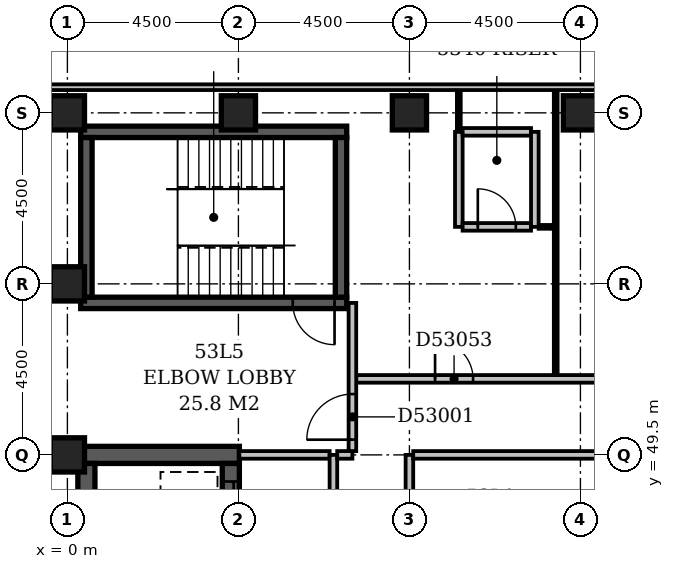
"""IFC4 building model, lengths in metres.
Left out: names, types, materials, properties, quantities, classifications, styles, units other than length and angle.
Written with IfcOpenShell. Run it as: python <this file> out.ifc"""

import sys

from ifc_helpers import new_model, si_unit, direction, frame, frame_2d, origin, origin_2d, place, context, subcontext, project, spatial, rectangle, extrude, element, fill, save


model = new_model("IFC4")
c1 = context("Model", 3, precision=1e-05, world=origin(), true_north=direction((0.0, 1.0)))
c2 = subcontext(c1, "Body", "Model", "MODEL_VIEW")
j1 = project(units=[si_unit("LENGTHUNIT", "METRE"), si_unit("PLANEANGLEUNIT", "RADIAN")], contexts=[c1])
p1 = place(None, origin())
s1 = spatial("IfcSite", under=j1, at=p1, CompositionType="ELEMENT")
p2 = place(p1, origin())
s2 = spatial("IfcBuilding", under=s1, at=p2, CompositionType="ELEMENT")
p3 = place(p2, frame((0.0, 0.0, 207.8)))
s3 = spatial("IfcBuildingStorey", under=s2, at=p3, CompositionType="ELEMENT", Elevation=207.8)
p4 = place(p3, frame((0.275, 49.5, -0.3), z_axis=(0.0, 0.0, 1.0), x_axis=(1.0, 0.0, 0.0)))
e1 = element("IfcWall", 1, at=p4, inside=s3, PredefinedType="SHEAR", context=c2, shape_type="SweptSolid", body=[
    extrude(rectangle(XDim=4.25, YDim=0.45, at=frame_2d((2.125, 0.0))), origin(), (0.0, 0.0, 1.0), 3.55),
])
p5 = place(p3, frame((0.35, 53.5, -0.3), z_axis=(0.0, 0.0, 1.0), x_axis=(1.0, 0.0, 0.0)))
e2 = element("IfcWall", 2, at=p5, inside=s3, PredefinedType="SHEAR", context=c2, shape_type="SweptSolid", body=[
    extrude(rectangle(XDim=7.0, YDim=0.3, at=frame_2d((3.5, 0.0))), origin(), (0.0, 0.0, 1.0), 3.55),
])
p6 = place(p5, frame((5.58, 0.0, 0.3)))
e3 = element("IfcOpeningElement", 3, at=p6, cuts=e2, PredefinedType="OPENING", context=c2, shape_type="SweptSolid", body=[
    extrude(rectangle(XDim=1.1, YDim=2.1, at=frame_2d((0.55, 1.05))), frame((0.0, 0.162, 0.0), z_axis=(0.0, -1.0, 0.0), x_axis=(1.0, 0.0, 0.0)), (0.0, 0.0, 1.0), 0.324),
])
p7 = place(p3, frame((0.35, 58.0, -0.3), z_axis=(0.0, 0.0, 1.0), x_axis=(1.0, 0.0, 0.0)))
e4 = element("IfcWall", 4, at=p7, inside=s3, PredefinedType="SHEAR", context=c2, shape_type="SweptSolid", body=[
    extrude(rectangle(XDim=7.0, YDim=0.3, at=frame_2d((3.5, 0.0))), origin(), (0.0, 0.0, 1.0), 3.55),
])
p8 = place(p3, frame((0.5, 27.15, -0.3), z_axis=(0.0, 0.0, 1.0), x_axis=(0.0, 1.0, 0.0)))
e5 = element("IfcWall", 5, at=p8, inside=s3, PredefinedType="SHEAR", context=c2, shape_type="SweptSolid", body=[
    extrude(rectangle(XDim=22.125, YDim=0.45, at=frame_2d((11.062, 0.0))), origin(), (0.0, 0.0, 1.0), 3.55),
])
p9 = place(p3, frame((0.5, 53.65, -0.3), z_axis=(0.0, 0.0, 1.0), x_axis=(0.0, 1.0, 0.0)))
e6 = element("IfcWall", 6, at=p9, inside=s3, PredefinedType="SHEAR", context=c2, shape_type="SweptSolid", body=[
    extrude(rectangle(XDim=4.2, YDim=0.3, at=frame_2d((2.1, 0.0))), origin(), (0.0, 0.0, 1.0), 3.55),
])
p10 = place(p3, frame((4.3, 27.15, -0.3), z_axis=(0.0, 0.0, 1.0), x_axis=(0.0, 1.0, 0.0)))
e7 = element("IfcWall", 7, at=p10, inside=s3, PredefinedType="SHEAR", context=c2, shape_type="SweptSolid", body=[
    extrude(rectangle(XDim=22.125, YDim=0.45, at=frame_2d((11.062, 0.0))), origin(), (0.0, 0.0, 1.0), 3.55),
])
p11 = place(p10, frame((3.05, 0.0, 0.3)))
e8 = element("IfcOpeningElement", 8, at=p11, cuts=e7, PredefinedType="OPENING", context=c2, shape_type="SweptSolid", body=[
    extrude(rectangle(XDim=1.1, YDim=2.1, at=frame_2d((0.55, 1.05))), frame((0.0, 0.237, 0.0), z_axis=(0.0, -1.0, 0.0), x_axis=(1.0, 0.0, 0.0)), (0.0, 0.0, 1.0), 0.474),
])
p12 = place(p10, frame((0.55, 0.0, 0.3)))
e9 = element("IfcOpeningElement", 9, at=p12, cuts=e7, PredefinedType="OPENING", context=c2, shape_type="SweptSolid", body=[
    extrude(rectangle(XDim=1.1, YDim=2.1, at=frame_2d((0.55, 1.05))), frame((0.0, 0.237, 0.0), z_axis=(0.0, -1.0, 0.0), x_axis=(1.0, 0.0, 0.0)), (0.0, 0.0, 1.0), 0.474),
])
p13 = place(p10, frame((20.55, 0.0, 0.3)))
e10 = element("IfcOpeningElement", 10, at=p13, cuts=e7, PredefinedType="OPENING", context=c2, shape_type="SweptSolid", body=[
    extrude(rectangle(XDim=1.1, YDim=2.1, at=frame_2d((0.55, 1.05))), frame((0.0, 0.237, 0.0), z_axis=(0.0, -1.0, 0.0), x_axis=(1.0, 0.0, 0.0)), (0.0, 0.0, 1.0), 0.474),
])
p14 = place(p10, frame((18.05, 0.0, 0.3)))
e11 = element("IfcOpeningElement", 11, at=p14, cuts=e7, PredefinedType="OPENING", context=c2, shape_type="SweptSolid", body=[
    extrude(rectangle(XDim=1.1, YDim=2.1, at=frame_2d((0.55, 1.05))), frame((0.0, 0.237, 0.0), z_axis=(0.0, -1.0, 0.0), x_axis=(1.0, 0.0, 0.0)), (0.0, 0.0, 1.0), 0.474),
])
p15 = place(p10, frame((15.55, 0.0, 0.3)))
e12 = element("IfcOpeningElement", 12, at=p15, cuts=e7, PredefinedType="OPENING", context=c2, shape_type="SweptSolid", body=[
    extrude(rectangle(XDim=1.1, YDim=2.1, at=frame_2d((0.55, 1.05))), frame((0.0, 0.237, 0.0), z_axis=(0.0, -1.0, 0.0), x_axis=(1.0, 0.0, 0.0)), (0.0, 0.0, 1.0), 0.474),
])
p16 = place(p10, frame((13.05, 0.0, 0.3)))
e13 = element("IfcOpeningElement", 13, at=p16, cuts=e7, PredefinedType="OPENING", context=c2, shape_type="SweptSolid", body=[
    extrude(rectangle(XDim=1.1, YDim=2.1, at=frame_2d((0.55, 1.05))), frame((0.0, 0.237, 0.0), z_axis=(0.0, -1.0, 0.0), x_axis=(1.0, 0.0, 0.0)), (0.0, 0.0, 1.0), 0.474),
])
p17 = place(p10, frame((10.55, 0.0, 0.3)))
e14 = element("IfcOpeningElement", 14, at=p17, cuts=e7, PredefinedType="OPENING", context=c2, shape_type="SweptSolid", body=[
    extrude(rectangle(XDim=1.1, YDim=2.1, at=frame_2d((0.55, 1.05))), frame((0.0, 0.237, 0.0), z_axis=(0.0, -1.0, 0.0), x_axis=(1.0, 0.0, 0.0)), (0.0, 0.0, 1.0), 0.474),
])
p18 = place(p10, frame((8.05, 0.0, 0.3)))
e15 = element("IfcOpeningElement", 15, at=p18, cuts=e7, PredefinedType="OPENING", context=c2, shape_type="SweptSolid", body=[
    extrude(rectangle(XDim=1.1, YDim=2.1, at=frame_2d((0.55, 1.05))), frame((0.0, 0.237, 0.0), z_axis=(0.0, -1.0, 0.0), x_axis=(1.0, 0.0, 0.0)), (0.0, 0.0, 1.0), 0.474),
])
p19 = place(p10, frame((5.55, 0.0, 0.3)))
e16 = element("IfcOpeningElement", 16, at=p19, cuts=e7, PredefinedType="OPENING", context=c2, shape_type="SweptSolid", body=[
    extrude(rectangle(XDim=1.1, YDim=2.1, at=frame_2d((0.55, 1.05))), frame((0.0, 0.237, 0.0), z_axis=(0.0, -1.0, 0.0), x_axis=(1.0, 0.0, 0.0)), (0.0, 0.0, 1.0), 0.474),
])
p20 = place(p3, frame((7.2, 53.65, -0.3), z_axis=(0.0, 0.0, 1.0), x_axis=(0.0, 1.0, 0.0)))
e17 = element("IfcWall", 17, at=p20, inside=s3, PredefinedType="SHEAR", context=c2, shape_type="SweptSolid", body=[
    extrude(rectangle(XDim=4.2, YDim=0.3, at=frame_2d((2.1, 0.0))), origin(), (0.0, 0.0, 1.0), 3.55),
])
for number, where, z_axis, x_axis in (
    (18, (0.0, 49.5, -0.3), (0.0, 0.0, 1.0), (1.0, 0.0, 0.0)),
    (19, (0.0, 54.0, -0.3), (0.0, 0.0, 1.0), (1.0, 0.0, 0.0)),
    (20, (0.0, 58.5, -0.3), (0.0, 0.0, 1.0), (1.0, 0.0, 0.0)),
    (21, (4.5, 58.5, -0.3), (0.0, 0.0, 1.0), (1.0, 0.0, 0.0)),
    (22, (9.0, 58.5, -0.3), (0.0, 0.0, 1.0), (1.0, 0.0, 0.0)),
    (23, (13.5, 58.5, -0.3), (0.0, 0.0, 1.0), (1.0, 0.0, 0.0)),
):
    element("IfcColumn", number, at=place(p3, frame(where, z_axis=z_axis, x_axis=x_axis)), inside=s3, PredefinedType="COLUMN", context=c2, shape_type="SweptSolid", body=[
        extrude(rectangle(XDim=0.9, YDim=0.9, at=origin_2d()), origin(), (0.0, 0.0, 1.0), 3.55),
    ])
p21 = place(p3, frame((50.1, 59.175, 0.0), z_axis=(0.0, 0.0, 1.0), x_axis=(-1.0, 0.0, 0.0)))
e24 = element("IfcWall", 24, at=p21, inside=s3, PredefinedType="STANDARD", context=c2, shape_type="SweptSolid", body=[
    extrude(rectangle(XDim=50.85, YDim=0.15, at=frame_2d((25.425, 0.0))), origin(), (0.0, 0.0, 1.0), 2.7),
])
p22 = place(p21, frame((19.65, 0.0, 0.6)))
e25 = element("IfcOpeningElement", 25, at=p22, cuts=e24, PredefinedType="OPENING", context=c2, shape_type="SweptSolid", body=[
    extrude(rectangle(XDim=2.4, YDim=1.8, at=frame_2d((1.2, 0.9))), frame((0.0, 0.087, 0.0), z_axis=(0.0, -1.0, 0.0), x_axis=(1.0, 0.0, 0.0)), (0.0, 0.0, 1.0), 0.174),
])
p23 = place(p3, frame((7.0, 34.6, 0.0), z_axis=(0.0, 0.0, 1.0), x_axis=(0.0, 1.0, 0.0)))
e26 = element("IfcWall", 26, at=p23, inside=s3, PredefinedType="PARTITIONING", context=c2, shape_type="SweptSolid", body=[
    extrude(rectangle(XDim=14.9, YDim=0.2, at=frame_2d((7.45, 0.0))), origin(), (0.0, 0.0, 1.0), 3.25),
])
p24 = place(p23, frame((2.8, 0.0, 0.0)))
e27 = element("IfcOpeningElement", 27, at=p24, cuts=e26, PredefinedType="OPENING", context=c2, shape_type="SweptSolid", body=[
    extrude(rectangle(XDim=1.2, YDim=2.1, at=frame_2d((0.6, 1.05))), frame((0.0, 0.112, 0.0), z_axis=(0.0, -1.0, 0.0), x_axis=(1.0, 0.0, 0.0)), (0.0, 0.0, 1.0), 0.224),
])
p25 = place(p23, frame((9.8, 0.0, 0.0)))
e28 = element("IfcOpeningElement", 28, at=p25, cuts=e26, PredefinedType="OPENING", context=c2, shape_type="SweptSolid", body=[
    extrude(rectangle(XDim=1.2, YDim=2.1, at=frame_2d((0.6, 1.05))), frame((0.0, 0.112, 0.0), z_axis=(0.0, -1.0, 0.0), x_axis=(1.0, 0.0, 0.0)), (0.0, 0.0, 1.0), 0.224),
])
p26 = place(p3, frame((4.525, 49.5, 0.0), z_axis=(0.0, 0.0, 1.0), x_axis=(1.0, 0.0, 0.0)))
e29 = element("IfcWall", 29, at=p26, inside=s3, PredefinedType="PARTITIONING", context=c2, shape_type="SweptSolid", body=[
    extrude(rectangle(XDim=2.375, YDim=0.2, at=frame_2d((1.188, 0.0))), origin(), (0.0, 0.0, 1.0), 3.25),
])
p27 = place(p3, frame((7.1, 49.5, 0.0), z_axis=(0.0, 0.0, 1.0), x_axis=(1.0, 0.0, 0.0)))
e30 = element("IfcWall", 30, at=p27, inside=s3, PredefinedType="PARTITIONING", context=c2, shape_type="SweptSolid", body=[
    extrude(rectangle(XDim=0.4, YDim=0.2, at=frame_2d((0.2, 0.0))), origin(), (0.0, 0.0, 1.0), 3.25),
])
p28 = place(p3, frame((7.5, 49.6, 0.0), z_axis=(0.0, 0.0, 1.0), x_axis=(0.0, 1.0, 0.0)))
e31 = element("IfcWall", 31, at=p28, inside=s3, PredefinedType="PARTITIONING", context=c2, shape_type="SweptSolid", body=[
    extrude(rectangle(XDim=3.9, YDim=0.2, at=frame_2d((1.95, 0.0))), origin(), (0.0, 0.0, 1.0), 3.25),
])
p29 = place(p28, frame((0.3, 0.0, 0.0)))
e32 = element("IfcOpeningElement", 32, at=p29, cuts=e31, PredefinedType="OPENING", context=c2, shape_type="SweptSolid", body=[
    extrude(rectangle(XDim=1.2, YDim=2.1, at=frame_2d((0.6, 1.05))), frame((0.0, 0.112, 0.0), z_axis=(0.0, -1.0, 0.0), x_axis=(1.0, 0.0, 0.0)), (0.0, 0.0, 1.0), 0.224),
])
p30 = place(p3, frame((9.0, 38.0, 0.0), z_axis=(0.0, 0.0, 1.0), x_axis=(0.0, 1.0, 0.0)))
e33 = element("IfcWall", 33, at=p30, inside=s3, PredefinedType="PARTITIONING", context=c2, shape_type="SweptSolid", body=[
    extrude(rectangle(XDim=11.5, YDim=0.2, at=frame_2d((5.75, 0.0))), origin(), (0.0, 0.0, 1.0), 3.25),
])
p31 = place(p30, frame((5.25, 0.0, 0.0)))
e34 = element("IfcOpeningElement", 34, at=p31, cuts=e33, PredefinedType="OPENING", context=c2, shape_type="SweptSolid", body=[
    extrude(rectangle(XDim=0.9, YDim=2.1, at=frame_2d((0.45, 1.05))), frame((0.0, 0.112, 0.0), z_axis=(0.0, -1.0, 0.0), x_axis=(1.0, 0.0, 0.0)), (0.0, 0.0, 1.0), 0.224),
])
p32 = place(p3, frame((9.1, 49.5, 0.0), z_axis=(0.0, 0.0, 1.0), x_axis=(1.0, 0.0, 0.0)))
e35 = element("IfcWall", 35, at=p32, inside=s3, PredefinedType="PARTITIONING", context=c2, shape_type="SweptSolid", body=[
    extrude(rectangle(XDim=11.3, YDim=0.2, at=frame_2d((5.65, 0.0))), origin(), (0.0, 0.0, 1.0), 3.25),
])
p33 = place(p32, frame((8.025, 0.0, 0.0)))
e36 = element("IfcOpeningElement", 36, at=p33, cuts=e35, PredefinedType="OPENING", context=c2, shape_type="SweptSolid", body=[
    extrude(rectangle(XDim=0.9, YDim=2.1, at=frame_2d((0.45, 1.05))), frame((0.0, 0.112, 0.0), z_axis=(0.0, -1.0, 0.0), x_axis=(1.0, 0.0, 0.0)), (0.0, 0.0, 1.0), 0.224),
])
p34 = place(p3, frame((7.6, 51.5, 0.0), z_axis=(0.0, 0.0, 1.0), x_axis=(1.0, 0.0, 0.0)))
e37 = element("IfcWall", 37, at=p34, inside=s3, PredefinedType="PARTITIONING", context=c2, shape_type="SweptSolid", body=[
    extrude(rectangle(XDim=15.3, YDim=0.2, at=frame_2d((7.65, 0.0))), origin(), (0.0, 0.0, 1.0), 3.25),
])
p35 = place(p34, frame((2.075, 0.0, 0.0)))
e38 = element("IfcOpeningElement", 38, at=p35, cuts=e37, PredefinedType="OPENING", context=c2, shape_type="SweptSolid", body=[
    extrude(rectangle(XDim=1.0, YDim=2.1, at=frame_2d((0.5, 1.05))), frame((0.0, 0.112, 0.0), z_axis=(0.0, -1.0, 0.0), x_axis=(1.0, 0.0, 0.0)), (0.0, 0.0, 1.0), 0.224),
])
p36 = place(p34, frame((9.875, 0.0, 0.0)))
e39 = element("IfcOpeningElement", 39, at=p36, cuts=e37, PredefinedType="OPENING", context=c2, shape_type="SweptSolid", body=[
    extrude(rectangle(XDim=0.9, YDim=2.1, at=frame_2d((0.45, 1.05))), frame((0.0, 0.112, 0.0), z_axis=(0.0, -1.0, 0.0), x_axis=(1.0, 0.0, 0.0)), (0.0, 0.0, 1.0), 0.224),
])
p37 = place(p3, frame((12.85, 51.6, 0.0), z_axis=(0.0, 0.0, 1.0), x_axis=(0.0, 1.0, 0.0)))
e40 = element("IfcWall", 40, at=p37, inside=s3, PredefinedType="PARTITIONING", context=c2, shape_type="SweptSolid", body=[
    extrude(rectangle(XDim=7.5, YDim=0.1, at=frame_2d((3.75, 0.0))), origin(), (0.0, 0.0, 1.0), 3.25),
])
p38 = place(p3, frame((10.3, 55.5, 0.0), z_axis=(0.0, 0.0, 1.0), x_axis=(0.0, 1.0, 0.0)))
e41 = element("IfcWall", 41, at=p38, inside=s3, PredefinedType="PARTITIONING", context=c2, shape_type="SweptSolid", body=[
    extrude(rectangle(XDim=2.5, YDim=0.2, at=frame_2d((1.25, 0.0))), origin(), (0.0, 0.0, 1.0), 3.25),
])
p39 = place(p3, frame((10.4, 55.5, 0.0), z_axis=(0.0, 0.0, 1.0), x_axis=(1.0, 0.0, 0.0)))
e42 = element("IfcWall", 42, at=p39, inside=s3, PredefinedType="PARTITIONING", context=c2, shape_type="SweptSolid", body=[
    extrude(rectangle(XDim=1.8, YDim=0.2, at=frame_2d((0.9, 0.0))), origin(), (0.0, 0.0, 1.0), 3.25),
])
p40 = place(p39, frame((0.4, 0.0, 0.0)))
e43 = element("IfcOpeningElement", 43, at=p40, cuts=e42, PredefinedType="OPENING", context=c2, shape_type="SweptSolid", body=[
    extrude(rectangle(XDim=1.0, YDim=2.1, at=frame_2d((0.5, 1.05))), frame((0.0, 0.112, 0.0), z_axis=(0.0, -1.0, 0.0), x_axis=(1.0, 0.0, 0.0)), (0.0, 0.0, 1.0), 0.224),
])
p41 = place(p3, frame((12.3, 55.5, 0.0), z_axis=(0.0, 0.0, 1.0), x_axis=(0.0, 1.0, 0.0)))
e44 = element("IfcWall", 44, at=p41, inside=s3, PredefinedType="PARTITIONING", context=c2, shape_type="SweptSolid", body=[
    extrude(rectangle(XDim=2.5, YDim=0.2, at=frame_2d((1.25, 0.0))), origin(), (0.0, 0.0, 1.0), 3.25),
])
p42 = place(p3, frame((12.4, 55.5, 0.0), z_axis=(0.0, 0.0, 1.0), x_axis=(1.0, 0.0, 0.0)))
e45 = element("IfcWall", 45, at=p42, inside=s3, PredefinedType="PARTITIONING", context=c2, shape_type="SweptSolid", body=[
    extrude(rectangle(XDim=0.4, YDim=0.1, at=frame_2d((0.2, 0.0))), origin(), (0.0, 0.0, 1.0), 3.25),
])
p43 = place(p3, frame((10.3, 58.0, 0.0), z_axis=(0.0, 0.0, 1.0), x_axis=(0.0, 1.0, 0.0)))
e46 = element("IfcWall", 46, at=p43, inside=s3, PredefinedType="PARTITIONING", context=c2, shape_type="SweptSolid", body=[
    extrude(rectangle(XDim=1.1, YDim=0.1, at=frame_2d((0.55, 0.0))), origin(), (0.0, 0.0, 1.0), 3.25),
])
p44 = place(p3, frame((10.4, 58.0, 0.0), z_axis=(0.0, 0.0, 1.0), x_axis=(1.0, 0.0, 0.0)))
e47 = element("IfcWall", 47, at=p44, inside=s3, PredefinedType="PARTITIONING", context=c2, shape_type="SweptSolid", body=[
    extrude(rectangle(XDim=1.8, YDim=0.2, at=frame_2d((0.9, 0.0))), origin(), (0.0, 0.0, 1.0), 3.25),
])
p45 = place(p29, origin())
e48 = element("IfcDoor", 48, at=p45, inside=s3, OperationType="SINGLE_SWING_LEFT", PredefinedType="DOOR", context=c2, shape_type="SweptSolid", body=[
    extrude(rectangle(XDim=1.2, YDim=2.1, at=frame_2d((0.6, 1.05))), frame((0.0, 0.025, 0.0), z_axis=(0.0, -1.0, 0.0), x_axis=(1.0, 0.0, 0.0)), (0.0, 0.0, 1.0), 0.05),
])
fill(e32, e48)
p46 = place(p13, origin())
e49 = element("IfcDoor", 49, at=p46, inside=s3, OperationType="SLIDING_TO_LEFT", PredefinedType="DOOR", context=c2, shape_type="SweptSolid", body=[
    extrude(rectangle(XDim=1.1, YDim=2.1, at=frame_2d((0.55, 1.05))), frame((0.0, 0.025, 0.0), z_axis=(0.0, -1.0, 0.0), x_axis=(1.0, 0.0, 0.0)), (0.0, 0.0, 1.0), 0.05),
])
fill(e10, e49)
p47 = place(p6, origin())
e50 = element("IfcDoor", 50, at=p47, inside=s3, OperationType="SINGLE_SWING_RIGHT", PredefinedType="DOOR", context=c2, shape_type="SweptSolid", body=[
    extrude(rectangle(XDim=1.1, YDim=2.1, at=frame_2d((0.55, 1.05))), frame((0.0, 0.025, 0.0), z_axis=(0.0, -1.0, 0.0), x_axis=(1.0, 0.0, 0.0)), (0.0, 0.0, 1.0), 0.05),
])
fill(e3, e50)
p48 = place(p35, origin())
e51 = element("IfcDoor", 51, at=p48, inside=s3, OperationType="SINGLE_SWING_LEFT", PredefinedType="DOOR", context=c2, shape_type="SweptSolid", body=[
    extrude(rectangle(XDim=1.0, YDim=2.1, at=frame_2d((0.5, 1.05))), frame((0.0, 0.025, 0.0), z_axis=(0.0, -1.0, 0.0), x_axis=(1.0, 0.0, 0.0)), (0.0, 0.0, 1.0), 0.05),
])
fill(e38, e51)
p49 = place(p40, origin())
e52 = element("IfcDoor", 52, at=p49, inside=s3, OperationType="SINGLE_SWING_LEFT", PredefinedType="DOOR", context=c2, shape_type="SweptSolid", body=[
    extrude(rectangle(XDim=1.0, YDim=2.1, at=frame_2d((0.5, 1.05))), frame((0.0, 0.025, 0.0), z_axis=(0.0, -1.0, 0.0), x_axis=(1.0, 0.0, 0.0)), (0.0, 0.0, 1.0), 0.05),
])
fill(e43, e52)
save(model, sys.argv[1])
